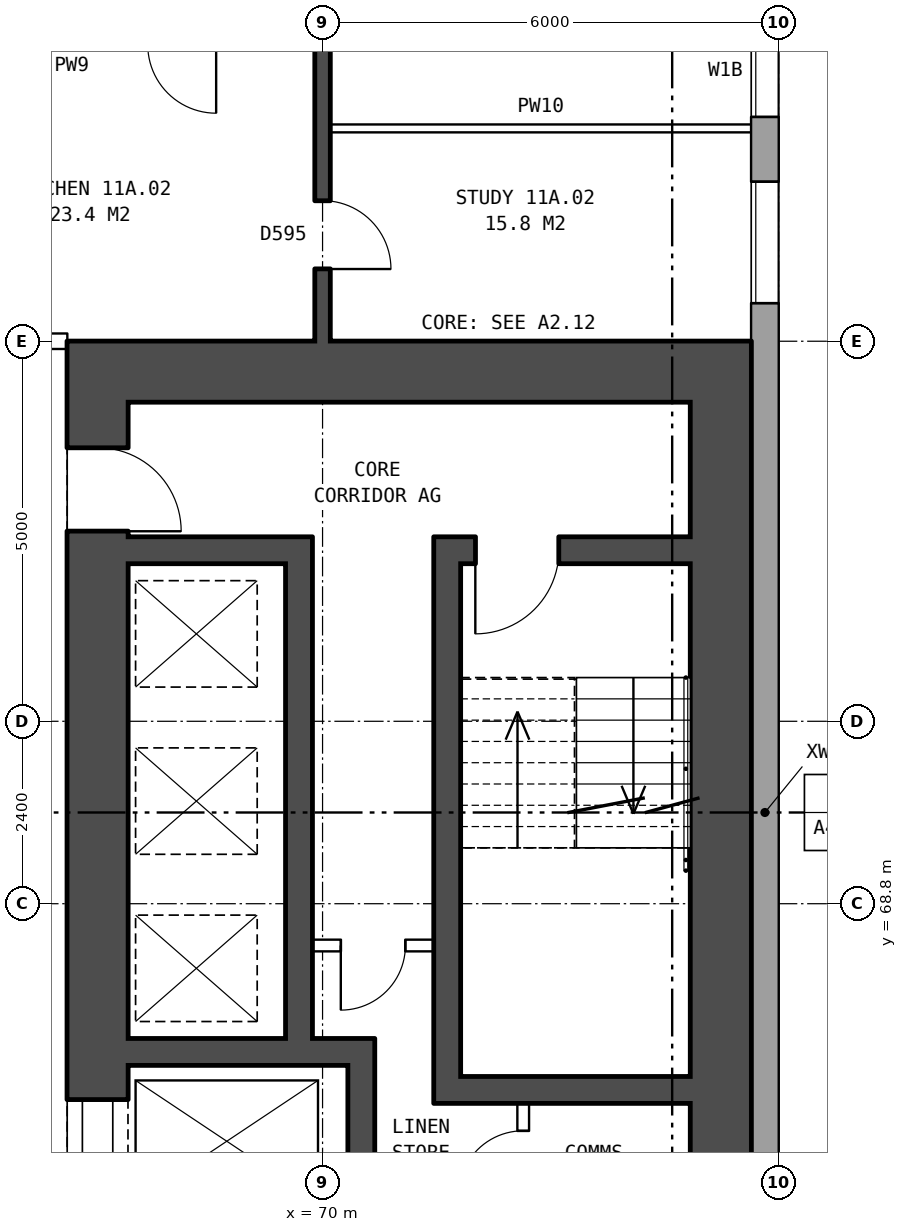
"""IFC4 building model, lengths in metres.
Left out: names, types, materials, properties, quantities, classifications, styles, units other than length and angle.
Written with IfcOpenShell. Run it as: python <this file> out.ifc"""

import sys

from ifc_helpers import new_model, si_unit, direction, frame, frame_2d, origin, place, context, subcontext, project, spatial, rectangle, extrude, element, fill, save


model = new_model("IFC4")
c1 = context("Model", 3, precision=1e-05, world=origin(), true_north=direction((0.0, 1.0)))
c2 = subcontext(c1, "Body", "Model", "MODEL_VIEW")
j1 = project(units=[si_unit("LENGTHUNIT", "METRE"), si_unit("PLANEANGLEUNIT", "RADIAN")], contexts=[c1])
p1 = place(None, origin())
s1 = spatial("IfcSite", under=j1, at=p1, CompositionType="ELEMENT")
p2 = place(p1, origin())
s2 = spatial("IfcBuilding", under=s1, at=p2, CompositionType="ELEMENT")
p3 = place(p2, frame((0.0, 0.0, 44.3)))
s3 = spatial("IfcBuildingStorey", under=s2, at=p3, CompositionType="ELEMENT", Elevation=44.3)
p4 = place(p3, frame((75.82, 57.075, 0.0), z_axis=(0.0, 0.0, 1.0), x_axis=(0.0, 1.0, 0.0)))
e1 = element("IfcWall", 1, at=p4, inside=s3, PredefinedType="STANDARD", context=c2, shape_type="SweptSolid", body=[
    extrude(rectangle(XDim=25.851, YDim=0.36, at=frame_2d((12.925, 0.0))), origin(), (0.0, 0.0, 1.0), 2.85),
])
p5 = place(p4, frame((1.475, 0.0, 0.8)))
e2 = element("IfcOpeningElement", 2, at=p5, cuts=e1, PredefinedType="OPENING", context=c2, shape_type="SweptSolid", body=[
    extrude(rectangle(XDim=1.0, YDim=1.2, at=frame_2d((0.5, 0.6))), frame((0.0, 0.19, 0.0), z_axis=(0.0, -1.0, 0.0), x_axis=(1.0, 0.0, 0.0)), (0.0, 0.0, 1.0), 0.38),
])
p6 = place(p4, frame((4.625, 0.0, 0.8)))
e3 = element("IfcOpeningElement", 3, at=p6, cuts=e1, PredefinedType="OPENING", context=c2, shape_type="SweptSolid", body=[
    extrude(rectangle(XDim=1.6, YDim=1.8, at=frame_2d((0.8, 0.9))), frame((0.0, 0.19, 0.0), z_axis=(0.0, -1.0, 0.0), x_axis=(1.0, 0.0, 0.0)), (0.0, 0.0, 1.0), 0.38),
])
p7 = place(p4, frame((19.625, 0.0, 0.8)))
e4 = element("IfcOpeningElement", 4, at=p7, cuts=e1, PredefinedType="OPENING", context=c2, shape_type="SweptSolid", body=[
    extrude(rectangle(XDim=1.6, YDim=1.8, at=frame_2d((0.8, 0.9))), frame((0.0, 0.19, 0.0), z_axis=(0.0, -1.0, 0.0), x_axis=(1.0, 0.0, 0.0)), (0.0, 0.0, 1.0), 0.38),
])
p8 = place(p4, frame((22.075, 0.0, 0.8)))
e5 = element("IfcOpeningElement", 5, at=p8, cuts=e1, PredefinedType="OPENING", context=c2, shape_type="SweptSolid", body=[
    extrude(rectangle(XDim=1.2, YDim=1.8, at=frame_2d((0.6, 0.9))), frame((0.0, 0.19, 0.0), z_axis=(0.0, -1.0, 0.0), x_axis=(1.0, 0.0, 0.0)), (0.0, 0.0, 1.0), 0.38),
])
p9 = place(p4, frame((2.775, 0.0, 0.8)))
e6 = element("IfcOpeningElement", 6, at=p9, cuts=e1, PredefinedType="OPENING", context=c2, shape_type="SweptSolid", body=[
    extrude(rectangle(XDim=1.4, YDim=1.8, at=frame_2d((0.7, 0.9))), frame((0.0, 0.19, 0.0), z_axis=(0.0, -1.0, 0.0), x_axis=(1.0, 0.0, 0.0)), (0.0, 0.0, 1.0), 0.38),
])
p10 = place(p4, frame((23.575, 0.0, 0.8)))
e7 = element("IfcOpeningElement", 7, at=p10, cuts=e1, PredefinedType="OPENING", context=c2, shape_type="SweptSolid", body=[
    extrude(rectangle(XDim=1.2, YDim=0.9, at=frame_2d((0.6, 0.45))), frame((0.0, 0.19, 0.0), z_axis=(0.0, -1.0, 0.0), x_axis=(1.0, 0.0, 0.0)), (0.0, 0.0, 1.0), 0.38),
])
p11 = place(p3, frame((67.04, 64.6, 0.0), z_axis=(0.0, 0.0, 1.0), x_axis=(0.0, 1.0, 0.0)))
e8 = element("IfcWall", 8, at=p11, inside=s3, PredefinedType="SHEAR", context=c2, shape_type="SweptSolid", body=[
    extrude(rectangle(XDim=10.8, YDim=0.8, at=frame_2d((5.4, 0.0))), origin(), (0.0, 0.0, 1.0), 2.85),
])
p12 = place(p11, frame((0.525, 0.0, 0.0)))
e9 = element("IfcOpeningElement", 9, at=p12, cuts=e8, PredefinedType="OPENING", context=c2, shape_type="SweptSolid", body=[
    extrude(rectangle(XDim=1.1, YDim=2.1, at=frame_2d((0.55, 1.05))), frame((0.0, 0.41, 0.0), z_axis=(0.0, -1.0, 0.0), x_axis=(1.0, 0.0, 0.0)), (0.0, 0.0, 1.0), 0.82),
])
p13 = place(p11, frame((9.1, 0.0, 0.0)))
e10 = element("IfcOpeningElement", 10, at=p13, cuts=e8, PredefinedType="OPENING", context=c2, shape_type="SweptSolid", body=[
    extrude(rectangle(XDim=1.1, YDim=2.1, at=frame_2d((0.55, 1.05))), frame((0.0, 0.41, 0.0), z_axis=(0.0, -1.0, 0.0), x_axis=(1.0, 0.0, 0.0)), (0.0, 0.0, 1.0), 0.82),
])
p14 = place(p3, frame((75.24, 64.6, 0.0), z_axis=(0.0, 0.0, 1.0), x_axis=(0.0, 1.0, 0.0)))
e11 = element("IfcWall", 11, at=p14, inside=s3, PredefinedType="SHEAR", context=c2, shape_type="SweptSolid", body=[
    extrude(rectangle(XDim=10.8, YDim=0.8, at=frame_2d((5.4, 0.0))), origin(), (0.0, 0.0, 1.0), 2.85),
])
p15 = place(p3, frame((66.64, 75.8, 0.0), z_axis=(0.0, 0.0, 1.0), x_axis=(1.0, 0.0, 0.0)))
e12 = element("IfcWall", 12, at=p15, inside=s3, PredefinedType="SHEAR", context=c2, shape_type="SweptSolid", body=[
    extrude(rectangle(XDim=9.0, YDim=0.8, at=frame_2d((4.5, 0.0))), origin(), (0.0, 0.0, 1.0), 2.85),
])
p16 = place(p3, frame((71.815, 66.35, 0.0), z_axis=(0.0, 0.0, 1.0), x_axis=(1.0, 0.0, 0.0)))
e13 = element("IfcWall", 13, at=p16, inside=s3, PredefinedType="SHEAR", context=c2, shape_type="SweptSolid", body=[
    extrude(rectangle(XDim=3.025, YDim=0.35, at=frame_2d((1.513, 0.0))), origin(), (0.0, 0.0, 1.0), 2.85),
])
p17 = place(p3, frame((67.44, 66.85, 0.0), z_axis=(0.0, 0.0, 1.0), x_axis=(1.0, 0.0, 0.0)))
e14 = element("IfcWall", 14, at=p17, inside=s3, PredefinedType="SHEAR", context=c2, shape_type="SweptSolid", body=[
    extrude(rectangle(XDim=3.245, YDim=0.35, at=frame_2d((1.623, 0.0))), origin(), (0.0, 0.0, 1.0), 2.85),
])
p18 = place(p3, frame((69.865, 68.25, 0.0), z_axis=(0.0, 0.0, 1.0), x_axis=(1.0, 0.0, 0.0)))
e15 = element("IfcWall", 15, at=p18, inside=s3, PredefinedType="PARTITIONING", context=c2, shape_type="SweptSolid", body=[
    extrude(rectangle(XDim=1.6, YDim=0.15, at=frame_2d((0.8, 0.0))), origin(), (0.0, 0.0, 1.0), 2.85),
])
p19 = place(p18, frame((0.375, 0.0, 0.0)))
e16 = element("IfcOpeningElement", 16, at=p19, cuts=e15, PredefinedType="OPENING", context=c2, shape_type="SweptSolid", body=[
    extrude(rectangle(XDim=0.85, YDim=2.1, at=frame_2d((0.425, 1.05))), frame((0.0, 0.085, 0.0), z_axis=(0.0, -1.0, 0.0), x_axis=(1.0, 0.0, 0.0)), (0.0, 0.0, 1.0), 0.17),
])
p20 = place(p3, frame((67.44, 73.45, 0.0), z_axis=(0.0, 0.0, 1.0), x_axis=(1.0, 0.0, 0.0)))
e17 = element("IfcWall", 17, at=p20, inside=s3, PredefinedType="SHEAR", context=c2, shape_type="SweptSolid", body=[
    extrude(rectangle(XDim=2.075, YDim=0.35, at=frame_2d((1.038, 0.0))), origin(), (0.0, 0.0, 1.0), 2.85),
])
p21 = place(p3, frame((71.815, 73.45, 0.0), z_axis=(0.0, 0.0, 1.0), x_axis=(1.0, 0.0, 0.0)))
e18 = element("IfcWall", 18, at=p21, inside=s3, PredefinedType="SHEAR", context=c2, shape_type="SweptSolid", body=[
    extrude(rectangle(XDim=3.025, YDim=0.35, at=frame_2d((1.513, 0.0))), origin(), (0.0, 0.0, 1.0), 2.85),
])
p22 = place(p21, frame((0.195, 0.0, 0.0)))
e19 = element("IfcOpeningElement", 19, at=p22, cuts=e18, PredefinedType="OPENING", context=c2, shape_type="SweptSolid", body=[
    extrude(rectangle(XDim=1.1, YDim=2.1, at=frame_2d((0.55, 1.05))), frame((0.0, 0.185, 0.0), z_axis=(0.0, -1.0, 0.0), x_axis=(1.0, 0.0, 0.0)), (0.0, 0.0, 1.0), 0.37),
])
p23 = place(p3, frame((69.69, 67.025, 0.0), z_axis=(0.0, 0.0, 1.0), x_axis=(0.0, 1.0, 0.0)))
e20 = element("IfcWall", 20, at=p23, inside=s3, PredefinedType="SHEAR", context=c2, shape_type="SweptSolid", body=[
    extrude(rectangle(XDim=6.6, YDim=0.35, at=frame_2d((3.3, 0.0))), origin(), (0.0, 0.0, 1.0), 2.85),
])
p24 = place(p3, frame((70.51, 64.6, 0.0), z_axis=(0.0, 0.0, 1.0), x_axis=(0.0, 1.0, 0.0)))
e21 = element("IfcWall", 21, at=p24, inside=s3, PredefinedType="SHEAR", context=c2, shape_type="SweptSolid", body=[
    extrude(rectangle(XDim=2.075, YDim=0.35, at=frame_2d((1.038, 0.0))), origin(), (0.0, 0.0, 1.0), 2.85),
])
p25 = place(p3, frame((71.64, 66.175, 0.0), z_axis=(0.0, 0.0, 1.0), x_axis=(0.0, 1.0, 0.0)))
e22 = element("IfcWall", 22, at=p25, inside=s3, PredefinedType="SHEAR", context=c2, shape_type="SweptSolid", body=[
    extrude(rectangle(XDim=7.45, YDim=0.35, at=frame_2d((3.725, 0.0))), origin(), (0.0, 0.0, 1.0), 2.85),
])
p26 = place(p3, frame((72.64, 64.6, 0.0), z_axis=(0.0, 0.0, 1.0), x_axis=(0.0, 1.0, 0.0)))
e23 = element("IfcWall", 23, at=p26, inside=s3, PredefinedType="PARTITIONING", context=c2, shape_type="SweptSolid", body=[
    extrude(rectangle(XDim=1.575, YDim=0.15, at=frame_2d((0.788, 0.0))), origin(), (0.0, 0.0, 1.0), 2.85),
])
p27 = place(p26, frame((0.363, 0.0, 0.0)))
e24 = element("IfcOpeningElement", 24, at=p27, cuts=e23, PredefinedType="OPENING", context=c2, shape_type="SweptSolid", body=[
    extrude(rectangle(XDim=0.85, YDim=2.1, at=frame_2d((0.425, 1.05))), frame((0.0, 0.085, 0.0), z_axis=(0.0, -1.0, 0.0), x_axis=(1.0, 0.0, 0.0)), (0.0, 0.0, 1.0), 0.17),
])
p28 = place(p3, frame((63.64, 76.2, 0.0), z_axis=(0.0, 0.0, 1.0), x_axis=(1.0, 0.0, 0.0)))
e25 = element("IfcWall", 25, at=p28, inside=s3, PredefinedType="PARTITIONING", context=c2, shape_type="SweptSolid", body=[
    extrude(rectangle(XDim=3.0, YDim=0.2, at=frame_2d((1.5, 0.0))), origin(), (0.0, 0.0, 1.0), 2.85),
])
p29 = place(p28, frame((1.18, 0.0, 0.0)))
e26 = element("IfcOpeningElement", 26, at=p29, cuts=e25, PredefinedType="OPENING", context=c2, shape_type="SweptSolid", body=[
    extrude(rectangle(XDim=1.0, YDim=2.1, at=frame_2d((0.5, 1.05))), frame((0.0, 0.11, 0.0), z_axis=(0.0, -1.0, 0.0), x_axis=(1.0, 0.0, 0.0)), (0.0, 0.0, 1.0), 0.22),
])
p30 = place(p3, frame((70.1, 79.0, 0.0), z_axis=(0.0, 0.0, 1.0), x_axis=(1.0, 0.0, 0.0)))
e27 = element("IfcWall", 27, at=p30, inside=s3, PredefinedType="PARTITIONING", context=c2, shape_type="SweptSolid", body=[
    extrude(rectangle(XDim=5.54, YDim=0.1, at=frame_2d((2.77, 0.0))), origin(), (0.0, 0.0, 1.0), 2.85),
])
p31 = place(p3, frame((70.0, 76.2, 0.0), z_axis=(0.0, 0.0, 1.0), x_axis=(0.0, 1.0, 0.0)))
e28 = element("IfcWall", 28, at=p31, inside=s3, PredefinedType="SOLIDWALL", context=c2, shape_type="SweptSolid", body=[
    extrude(rectangle(XDim=9.44, YDim=0.2, at=frame_2d((4.72, 0.0))), origin(), (0.0, 0.0, 1.0), 2.85),
])
p32 = place(p31, frame((6.22, 0.0, 0.0)))
e29 = element("IfcOpeningElement", 29, at=p32, cuts=e28, PredefinedType="OPENING", context=c2, shape_type="SweptSolid", body=[
    extrude(rectangle(XDim=0.9, YDim=2.1, at=frame_2d((0.45, 1.05))), frame((0.0, 0.11, 0.0), z_axis=(0.0, -1.0, 0.0), x_axis=(1.0, 0.0, 0.0)), (0.0, 0.0, 1.0), 0.22),
])
p33 = place(p31, frame((0.95, 0.0, 0.0)))
e30 = element("IfcOpeningElement", 30, at=p33, cuts=e28, PredefinedType="OPENING", context=c2, shape_type="SweptSolid", body=[
    extrude(rectangle(XDim=0.9, YDim=2.1, at=frame_2d((0.45, 1.05))), frame((0.0, 0.11, 0.0), z_axis=(0.0, -1.0, 0.0), x_axis=(1.0, 0.0, 0.0)), (0.0, 0.0, 1.0), 0.22),
])
p34 = place(p7, origin())
e31 = element("IfcWindow", 31, at=p34, inside=s3, PartitioningType="SINGLE_PANEL", PredefinedType="WINDOW", context=c2, shape_type="SweptSolid", body=[
    extrude(rectangle(XDim=1.6, YDim=1.8, at=frame_2d((0.8, 0.9))), frame((0.0, 0.15, 0.0), z_axis=(0.0, -1.0, 0.0), x_axis=(1.0, 0.0, 0.0)), (0.0, 0.0, 1.0), 0.06),
])
fill(e4, e31)
p35 = place(p8, origin())
e32 = element("IfcWindow", 32, at=p35, inside=s3, PartitioningType="SINGLE_PANEL", PredefinedType="WINDOW", context=c2, shape_type="SweptSolid", body=[
    extrude(rectangle(XDim=1.2, YDim=1.8, at=frame_2d((0.6, 0.9))), frame((0.0, 0.15, 0.0), z_axis=(0.0, -1.0, 0.0), x_axis=(1.0, 0.0, 0.0)), (0.0, 0.0, 1.0), 0.06),
])
fill(e5, e32)
p36 = place(p12, origin())
e33 = element("IfcDoor", 33, at=p36, inside=s3, OperationType="DOUBLE_DOOR_SLIDING", PredefinedType="DOOR", context=c2, shape_type="SweptSolid", body=[
    extrude(rectangle(XDim=1.1, YDim=2.1, at=frame_2d((0.55, 1.05))), frame((0.0, -0.335, 0.0), z_axis=(0.0, -1.0, 0.0), x_axis=(1.0, 0.0, 0.0)), (0.0, 0.0, 1.0), 0.05),
])
fill(e9, e33)
p37 = place(p13, frame((1.1, 0.0, 0.0), z_axis=(0.0, 0.0, 1.0), x_axis=(-1.0, 0.0, 0.0)))
e34 = element("IfcDoor", 34, at=p37, inside=s3, OperationType="SINGLE_SWING_RIGHT", PredefinedType="DOOR", context=c2, shape_type="SweptSolid", body=[
    extrude(rectangle(XDim=1.1, YDim=2.1, at=frame_2d((0.55, 1.05))), frame((0.0, 0.385, 0.0), z_axis=(0.0, -1.0, 0.0), x_axis=(1.0, 0.0, 0.0)), (0.0, 0.0, 1.0), 0.05),
])
fill(e10, e34)
p38 = place(p22, frame((1.1, 0.0, 0.0), z_axis=(0.0, 0.0, 1.0), x_axis=(-1.0, 0.0, 0.0)))
e35 = element("IfcDoor", 35, at=p38, inside=s3, OperationType="SINGLE_SWING_RIGHT", PredefinedType="DOOR", context=c2, shape_type="SweptSolid", body=[
    extrude(rectangle(XDim=1.1, YDim=2.1, at=frame_2d((0.55, 1.05))), frame((0.0, 0.025, 0.0), z_axis=(0.0, -1.0, 0.0), x_axis=(1.0, 0.0, 0.0)), (0.0, 0.0, 1.0), 0.05),
])
fill(e19, e35)
p39 = place(p19, frame((0.85, 0.0, 0.0), z_axis=(0.0, 0.0, 1.0), x_axis=(-1.0, 0.0, 0.0)))
e36 = element("IfcDoor", 36, at=p39, inside=s3, OperationType="SINGLE_SWING_RIGHT", PredefinedType="DOOR", context=c2, shape_type="SweptSolid", body=[
    extrude(rectangle(XDim=0.85, YDim=2.1, at=frame_2d((0.425, 1.05))), frame((0.0, 0.025, 0.0), z_axis=(0.0, -1.0, 0.0), x_axis=(1.0, 0.0, 0.0)), (0.0, 0.0, 1.0), 0.05),
])
fill(e16, e36)
p40 = place(p27, origin())
e37 = element("IfcDoor", 37, at=p40, inside=s3, OperationType="SINGLE_SWING_LEFT", PredefinedType="DOOR", context=c2, shape_type="SweptSolid", body=[
    extrude(rectangle(XDim=0.85, YDim=2.1, at=frame_2d((0.425, 1.05))), frame((0.0, 0.025, 0.0), z_axis=(0.0, -1.0, 0.0), x_axis=(1.0, 0.0, 0.0)), (0.0, 0.0, 1.0), 0.05),
])
fill(e24, e37)
p41 = place(p33, frame((0.9, 0.0, 0.0), z_axis=(0.0, 0.0, 1.0), x_axis=(-1.0, 0.0, 0.0)))
e38 = element("IfcDoor", 38, at=p41, inside=s3, OperationType="SINGLE_SWING_RIGHT", PredefinedType="DOOR", context=c2, shape_type="SweptSolid", body=[
    extrude(rectangle(XDim=0.9, YDim=2.1, at=frame_2d((0.45, 1.05))), frame((0.0, 0.025, 0.0), z_axis=(0.0, -1.0, 0.0), x_axis=(1.0, 0.0, 0.0)), (0.0, 0.0, 1.0), 0.05),
])
fill(e30, e38)
save(model, sys.argv[1])
